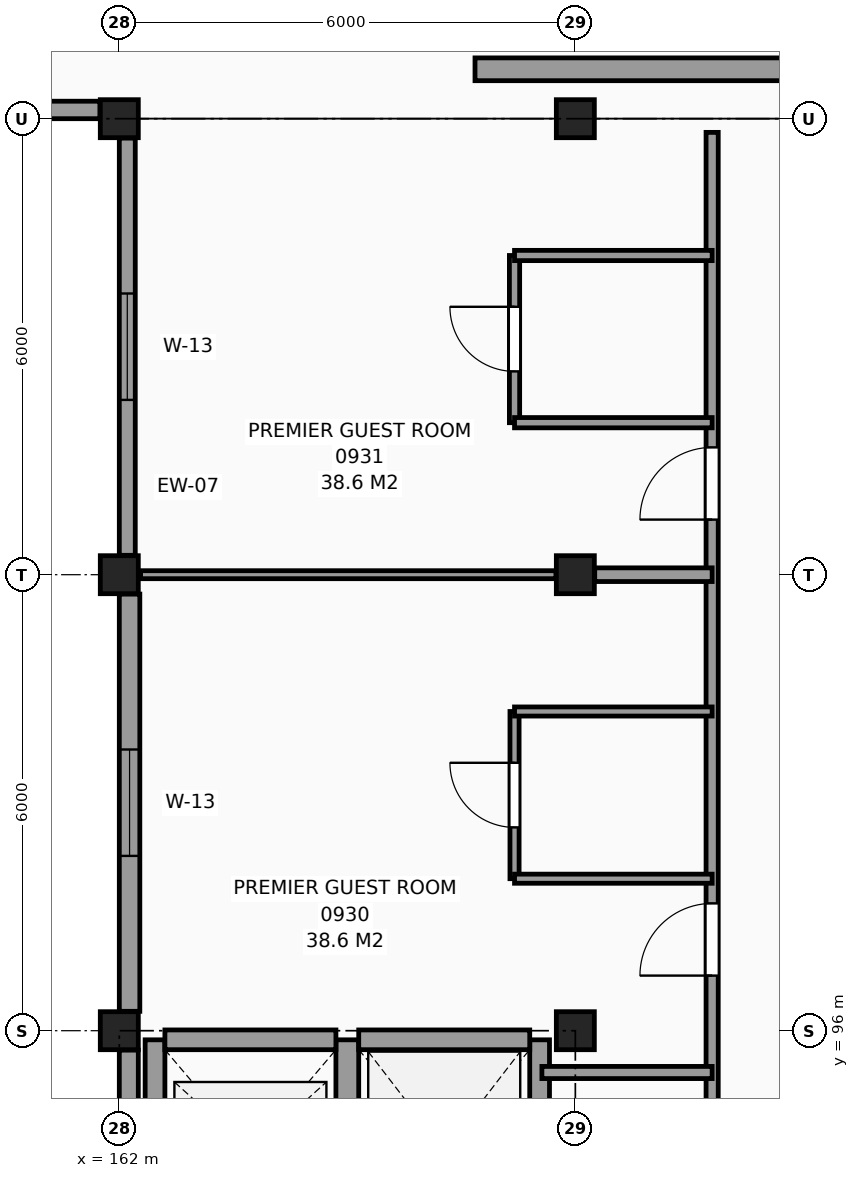
"""IFC4 building model, lengths in metres.
Left out: names, types, materials, properties, quantities, classifications, styles, units other than length and angle.
Written with IfcOpenShell. Run it as: python <this file> out.ifc"""

import sys

from ifc_helpers import new_model, si_unit, direction, frame, frame_2d, origin, origin_2d, place, context, subcontext, project, spatial, rectangle, extrude, element, fill, save


model = new_model("IFC4")
c1 = context("Model", 3, precision=1e-05, world=origin(), true_north=direction((0.0, 1.0)))
c2 = subcontext(c1, "Body", "Model", "MODEL_VIEW")
j1 = project(units=[si_unit("LENGTHUNIT", "METRE"), si_unit("PLANEANGLEUNIT", "RADIAN")], contexts=[c1])
p1 = place(None, origin())
s1 = spatial("IfcSite", under=j1, at=p1, CompositionType="ELEMENT")
p2 = place(p1, origin())
s2 = spatial("IfcBuilding", under=s1, at=p2, CompositionType="ELEMENT")
p3 = place(p2, frame((0.0, 0.0, 38.1)))
s3 = spatial("IfcBuildingStorey", under=s2, at=p3, CompositionType="ELEMENT", Elevation=38.1)
for number, where, z_axis, x_axis in (
    (1, (162.0, 96.0, 0.0), (0.0, 0.0, 1.0), (1.0, 0.0, 0.0)),
    (2, (162.0, 102.0, 0.0), (0.0, 0.0, 1.0), (1.0, 0.0, 0.0)),
    (3, (162.0, 108.0, 0.0), (0.0, 0.0, 1.0), (1.0, 0.0, 0.0)),
    (4, (168.0, 96.0, 0.0), (0.0, 0.0, 1.0), (1.0, 0.0, 0.0)),
    (5, (168.0, 102.0, 0.0), (0.0, 0.0, 1.0), (1.0, 0.0, 0.0)),
    (6, (168.0, 108.0, 0.0), (0.0, 0.0, 1.0), (1.0, 0.0, 0.0)),
):
    element("IfcColumn", number, at=place(p3, frame(where, z_axis=z_axis, x_axis=x_axis)), inside=s3, PredefinedType="COLUMN", context=c2, shape_type="SweptSolid", body=[
        extrude(rectangle(XDim=0.5, YDim=0.5, at=origin_2d()), origin(), (0.0, 0.0, 1.0), 3.3),
    ])
p4 = place(p3, frame((156.255, 108.115, 0.0), z_axis=(0.0, 0.0, 1.0), x_axis=(1.0, 0.0, 0.0)))
e7 = element("IfcWall", 7, at=p4, inside=s3, PredefinedType="SOLIDWALL", context=c2, shape_type="SweptSolid", body=[
    extrude(rectangle(XDim=5.49, YDim=0.23, at=frame_2d((2.745, 0.0))), origin(), (0.0, 0.0, 1.0), 3.06),
])
p5 = place(p3, frame((162.105, 107.745, 0.0), z_axis=(0.0, 0.0, 1.0), x_axis=(0.0, -1.0, 0.0)))
e8 = element("IfcWall", 8, at=p5, inside=s3, PredefinedType="SOLIDWALL", context=c2, shape_type="SweptSolid", body=[
    extrude(rectangle(XDim=5.49, YDim=0.21, at=frame_2d((2.745, 0.0))), origin(), (0.0, 0.0, 1.0), 2.41),
])
p6 = place(p5, frame((2.045, 0.0, 0.8)))
e9 = element("IfcOpeningElement", 9, at=p6, cuts=e8, PredefinedType="OPENING", context=c2, shape_type="SweptSolid", body=[
    extrude(rectangle(XDim=1.4, YDim=1.4, at=frame_2d((0.7, 0.7))), frame((0.0, 0.115, 0.0), z_axis=(0.0, -1.0, 0.0), x_axis=(1.0, 0.0, 0.0)), (0.0, 0.0, 1.0), 0.23),
])
p7 = place(p3, frame((162.135, 101.745, 0.0), z_axis=(0.0, 0.0, 1.0), x_axis=(0.0, -1.0, 0.0)))
e10 = element("IfcWall", 10, at=p7, inside=s3, PredefinedType="SOLIDWALL", context=c2, shape_type="SweptSolid", body=[
    extrude(rectangle(XDim=5.49, YDim=0.27, at=frame_2d((2.745, 0.0))), origin(), (0.0, 0.0, 1.0), 2.41),
])
p8 = place(p7, frame((2.045, 0.0, 0.8)))
e11 = element("IfcOpeningElement", 11, at=p8, cuts=e10, PredefinedType="OPENING", context=c2, shape_type="SweptSolid", body=[
    extrude(rectangle(XDim=1.4, YDim=1.4, at=frame_2d((0.7, 0.7))), frame((0.0, 0.145, 0.0), z_axis=(0.0, -1.0, 0.0), x_axis=(1.0, 0.0, 0.0)), (0.0, 0.0, 1.0), 0.29),
])
p9 = place(p3, frame((162.125, 95.745, 0.0), z_axis=(0.0, 0.0, 1.0), x_axis=(0.0, -1.0, 0.0)))
e12 = element("IfcWall", 12, at=p9, inside=s3, PredefinedType="SOLIDWALL", context=c2, shape_type="SweptSolid", body=[
    extrude(rectangle(XDim=5.49, YDim=0.25, at=frame_2d((2.745, 0.0))), origin(), (0.0, 0.0, 1.0), 2.41),
])
p10 = place(p3, frame((166.68, 108.65, 0.0), z_axis=(0.0, 0.0, 1.0), x_axis=(1.0, 0.0, 0.0)))
e13 = element("IfcWall", 13, at=p10, inside=s3, PredefinedType="SHEAR", context=c2, shape_type="SweptSolid", body=[
    extrude(rectangle(XDim=4.24, YDim=0.3, at=frame_2d((2.12, 0.0))), origin(), (0.0, 0.0, 1.0), 3.3),
])
p11 = place(p3, frame((162.47, 92.97, 0.0), z_axis=(0.0, 0.0, 1.0), x_axis=(0.0, 1.0, 0.0)))
e14 = element("IfcWall", 14, at=p11, inside=s3, PredefinedType="SHEAR", context=c2, shape_type="SweptSolid", body=[
    extrude(rectangle(XDim=2.91, YDim=0.26, at=frame_2d((1.455, 0.0))), origin(), (0.0, 0.0, 1.0), 3.3),
])
p12 = place(p3, frame((165.0, 92.97, 0.0), z_axis=(0.0, 0.0, 1.0), x_axis=(0.0, 1.0, 0.0)))
e15 = element("IfcWall", 15, at=p12, inside=s3, PredefinedType="SHEAR", context=c2, shape_type="SweptSolid", body=[
    extrude(rectangle(XDim=2.91, YDim=0.3, at=frame_2d((1.455, 0.0))), origin(), (0.0, 0.0, 1.0), 3.3),
])
p13 = place(p3, frame((162.6, 95.88, 0.0), z_axis=(0.0, 0.0, 1.0), x_axis=(1.0, 0.0, 0.0)))
e16 = element("IfcWall", 16, at=p13, inside=s3, PredefinedType="SHEAR", context=c2, shape_type="SweptSolid", body=[
    extrude(rectangle(XDim=2.25, YDim=0.26, at=frame_2d((1.125, 0.0))), origin(), (0.0, 0.0, 1.0), 3.3),
])
p14 = place(p3, frame((167.53, 92.97, 0.0), z_axis=(0.0, 0.0, 1.0), x_axis=(0.0, 1.0, 0.0)))
e17 = element("IfcWall", 17, at=p14, inside=s3, PredefinedType="SHEAR", context=c2, shape_type="SweptSolid", body=[
    extrude(rectangle(XDim=2.91, YDim=0.26, at=frame_2d((1.455, 0.0))), origin(), (0.0, 0.0, 1.0), 3.3),
])
p15 = place(p3, frame((165.15, 95.88, 0.0), z_axis=(0.0, 0.0, 1.0), x_axis=(1.0, 0.0, 0.0)))
e18 = element("IfcWall", 18, at=p15, inside=s3, PredefinedType="SHEAR", context=c2, shape_type="SweptSolid", body=[
    extrude(rectangle(XDim=2.25, YDim=0.26, at=frame_2d((1.125, 0.0))), origin(), (0.0, 0.0, 1.0), 3.3),
])
p16 = place(p3, frame((167.2, 98.0, 0.0), z_axis=(0.0, 0.0, 1.0), x_axis=(0.0, 1.0, 0.0)))
e19 = element("IfcWall", 19, at=p16, inside=s3, PredefinedType="PARTITIONING", context=c2, shape_type="SweptSolid", body=[
    extrude(rectangle(XDim=2.2, YDim=0.12, at=frame_2d((1.1, 0.0))), origin(), (0.0, 0.0, 1.0), 3.06),
])
p17 = place(p16, frame((0.675, 0.0, 0.0)))
e20 = element("IfcOpeningElement", 20, at=p17, cuts=e19, PredefinedType="OPENING", context=c2, shape_type="SweptSolid", body=[
    extrude(rectangle(XDim=0.85, YDim=2.1, at=frame_2d((0.425, 1.05))), frame((0.0, 0.07, 0.0), z_axis=(0.0, -1.0, 0.0), x_axis=(1.0, 0.0, 0.0)), (0.0, 0.0, 1.0), 0.14),
])
p18 = place(p3, frame((167.2, 104.0, 0.0), z_axis=(0.0, 0.0, 1.0), x_axis=(0.0, 1.0, 0.0)))
e21 = element("IfcWall", 21, at=p18, inside=s3, PredefinedType="PARTITIONING", context=c2, shape_type="SweptSolid", body=[
    extrude(rectangle(XDim=2.2, YDim=0.135, at=frame_2d((1.1, 0.0))), origin(), (0.0, 0.0, 1.0), 3.06),
])
p19 = place(p18, frame((0.675, 0.0, 0.0)))
e22 = element("IfcOpeningElement", 22, at=p19, cuts=e21, PredefinedType="OPENING", context=c2, shape_type="SweptSolid", body=[
    extrude(rectangle(XDim=0.85, YDim=2.1, at=frame_2d((0.425, 1.05))), frame((0.0, 0.078, 0.0), z_axis=(0.0, -1.0, 0.0), x_axis=(1.0, 0.0, 0.0)), (0.0, 0.0, 1.0), 0.155),
])
p20 = place(p3, frame((169.8, 42.215, 0.0), z_axis=(0.0, 0.0, 1.0), x_axis=(0.0, 1.0, 0.0)))
e23 = element("IfcWall", 23, at=p20, inside=s3, PredefinedType="PARTITIONING", context=c2, shape_type="SweptSolid", body=[
    extrude(rectangle(XDim=65.605, YDim=0.16, at=frame_2d((32.802, 0.0))), origin(), (0.0, 0.0, 1.0), 3.06),
])
p21 = place(p20, frame((50.185, 0.0, 0.0)))
e24 = element("IfcOpeningElement", 24, at=p21, cuts=e23, PredefinedType="OPENING", context=c2, shape_type="SweptSolid", body=[
    extrude(rectangle(XDim=1.2, YDim=2.2, at=frame_2d((0.6, 1.1))), frame((0.0, 0.09, 0.0), z_axis=(0.0, -1.0, 0.0), x_axis=(1.0, 0.0, 0.0)), (0.0, 0.0, 1.0), 0.18),
])
p22 = place(p20, frame((32.285, 0.0, 0.0)))
e25 = element("IfcOpeningElement", 25, at=p22, cuts=e23, PredefinedType="OPENING", context=c2, shape_type="SweptSolid", body=[
    extrude(rectangle(XDim=1.0, YDim=2.15, at=frame_2d((0.5, 1.075))), frame((0.0, 0.09, 0.0), z_axis=(0.0, -1.0, 0.0), x_axis=(1.0, 0.0, 0.0)), (0.0, 0.0, 1.0), 0.18),
])
p23 = place(p20, frame((0.46, 0.0, 0.0)))
e26 = element("IfcOpeningElement", 26, at=p23, cuts=e23, PredefinedType="OPENING", context=c2, shape_type="SweptSolid", body=[
    extrude(rectangle(XDim=0.95, YDim=2.1, at=frame_2d((0.475, 1.05))), frame((0.0, 0.09, 0.0), z_axis=(0.0, -1.0, 0.0), x_axis=(1.0, 0.0, 0.0)), (0.0, 0.0, 1.0), 0.18),
])
p24 = place(p20, frame((6.51, 0.0, 0.0)))
e27 = element("IfcOpeningElement", 27, at=p24, cuts=e23, PredefinedType="OPENING", context=c2, shape_type="SweptSolid", body=[
    extrude(rectangle(XDim=0.95, YDim=2.1, at=frame_2d((0.475, 1.05))), frame((0.0, 0.09, 0.0), z_axis=(0.0, -1.0, 0.0), x_axis=(1.0, 0.0, 0.0)), (0.0, 0.0, 1.0), 0.18),
])
p25 = place(p20, frame((12.51, 0.0, 0.0)))
e28 = element("IfcOpeningElement", 28, at=p25, cuts=e23, PredefinedType="OPENING", context=c2, shape_type="SweptSolid", body=[
    extrude(rectangle(XDim=0.95, YDim=2.1, at=frame_2d((0.475, 1.05))), frame((0.0, 0.09, 0.0), z_axis=(0.0, -1.0, 0.0), x_axis=(1.0, 0.0, 0.0)), (0.0, 0.0, 1.0), 0.18),
])
p26 = place(p20, frame((18.51, 0.0, 0.0)))
e29 = element("IfcOpeningElement", 29, at=p26, cuts=e23, PredefinedType="OPENING", context=c2, shape_type="SweptSolid", body=[
    extrude(rectangle(XDim=0.95, YDim=2.1, at=frame_2d((0.475, 1.05))), frame((0.0, 0.09, 0.0), z_axis=(0.0, -1.0, 0.0), x_axis=(1.0, 0.0, 0.0)), (0.0, 0.0, 1.0), 0.18),
])
p27 = place(p20, frame((24.51, 0.0, 0.0)))
e30 = element("IfcOpeningElement", 30, at=p27, cuts=e23, PredefinedType="OPENING", context=c2, shape_type="SweptSolid", body=[
    extrude(rectangle(XDim=0.95, YDim=2.1, at=frame_2d((0.475, 1.05))), frame((0.0, 0.09, 0.0), z_axis=(0.0, -1.0, 0.0), x_axis=(1.0, 0.0, 0.0)), (0.0, 0.0, 1.0), 0.18),
])
p28 = place(p20, frame((54.51, 0.0, 0.0)))
e31 = element("IfcOpeningElement", 31, at=p28, cuts=e23, PredefinedType="OPENING", context=c2, shape_type="SweptSolid", body=[
    extrude(rectangle(XDim=0.95, YDim=2.1, at=frame_2d((0.475, 1.05))), frame((0.0, 0.09, 0.0), z_axis=(0.0, -1.0, 0.0), x_axis=(1.0, 0.0, 0.0)), (0.0, 0.0, 1.0), 0.18),
])
p29 = place(p20, frame((60.51, 0.0, 0.0)))
e32 = element("IfcOpeningElement", 32, at=p29, cuts=e23, PredefinedType="OPENING", context=c2, shape_type="SweptSolid", body=[
    extrude(rectangle(XDim=0.95, YDim=2.1, at=frame_2d((0.475, 1.05))), frame((0.0, 0.09, 0.0), z_axis=(0.0, -1.0, 0.0), x_axis=(1.0, 0.0, 0.0)), (0.0, 0.0, 1.0), 0.18),
])
p30 = place(p3, frame((167.56, 95.45, 0.0), z_axis=(0.0, 0.0, 1.0), x_axis=(1.0, 0.0, 0.0)))
e33 = element("IfcWall", 33, at=p30, inside=s3, PredefinedType="PARTITIONING", context=c2, shape_type="SweptSolid", body=[
    extrude(rectangle(XDim=2.24, YDim=0.16, at=frame_2d((1.12, 0.0))), origin(), (0.0, 0.0, 1.0), 3.06),
])
for number, where, z_axis, x_axis in (
    (34, (167.2, 98.0, 0.0), (0.0, 0.0, 1.0), (1.0, 0.0, 0.0)),
    (35, (167.2, 100.2, 0.0), (0.0, 0.0, 1.0), (1.0, 0.0, 0.0)),
):
    element("IfcWall", number, at=place(p3, frame(where, z_axis=z_axis, x_axis=x_axis)), inside=s3, PredefinedType="PARTITIONING", context=c2, shape_type="SweptSolid", body=[
        extrude(rectangle(XDim=2.6, YDim=0.12, at=frame_2d((1.3, 0.0))), origin(), (0.0, 0.0, 1.0), 3.06),
    ])
p31 = place(p3, frame((162.28, 102.0, 0.0), z_axis=(0.0, 0.0, 1.0), x_axis=(1.0, 0.0, 0.0)))
e36 = element("IfcWall", 36, at=p31, inside=s3, PredefinedType="PARTITIONING", context=c2, shape_type="SweptSolid", body=[
    extrude(rectangle(XDim=5.465, YDim=0.105, at=frame_2d((2.732, 0.0))), origin(), (0.0, 0.0, 1.0), 2.46),
])
p32 = place(p3, frame((168.255, 102.0, 0.0), z_axis=(0.0, 0.0, 1.0), x_axis=(1.0, 0.0, 0.0)))
e37 = element("IfcWall", 37, at=p32, inside=s3, PredefinedType="PARTITIONING", context=c2, shape_type="SweptSolid", body=[
    extrude(rectangle(XDim=1.545, YDim=0.18, at=frame_2d((0.772, 0.0))), origin(), (0.0, 0.0, 1.0), 2.61),
])
for number, where, z_axis, x_axis in (
    (38, (167.2, 104.0, 0.0), (0.0, 0.0, 1.0), (1.0, 0.0, 0.0)),
    (39, (167.2, 106.2, 0.0), (0.0, 0.0, 1.0), (1.0, 0.0, 0.0)),
):
    element("IfcWall", number, at=place(p3, frame(where, z_axis=z_axis, x_axis=x_axis)), inside=s3, PredefinedType="PARTITIONING", context=c2, shape_type="SweptSolid", body=[
        extrude(rectangle(XDim=2.6, YDim=0.135, at=frame_2d((1.3, 0.0))), origin(), (0.0, 0.0, 1.0), 3.06),
    ])
p33 = place(p8, origin())
e40 = element("IfcWindow", 40, at=p33, inside=s3, PartitioningType="SINGLE_PANEL", PredefinedType="WINDOW", context=c2, shape_type="SweptSolid", body=[
    extrude(rectangle(XDim=1.4, YDim=1.4, at=frame_2d((0.7, 0.7))), frame((0.0, 0.03, 0.0), z_axis=(0.0, -1.0, 0.0), x_axis=(1.0, 0.0, 0.0)), (0.0, 0.0, 1.0), 0.06),
])
fill(e11, e40)
p34 = place(p6, origin())
e41 = element("IfcWindow", 41, at=p34, inside=s3, PartitioningType="SINGLE_PANEL", PredefinedType="WINDOW", context=c2, shape_type="SweptSolid", body=[
    extrude(rectangle(XDim=1.4, YDim=1.4, at=frame_2d((0.7, 0.7))), frame((0.0, 0.03, 0.0), z_axis=(0.0, -1.0, 0.0), x_axis=(1.0, 0.0, 0.0)), (0.0, 0.0, 1.0), 0.06),
])
fill(e9, e41)
p35 = place(p17, origin())
e42 = element("IfcDoor", 42, at=p35, inside=s3, OperationType="SINGLE_SWING_RIGHT", PredefinedType="DOOR", context=c2, shape_type="SweptSolid", body=[
    extrude(rectangle(XDim=0.85, YDim=2.1, at=frame_2d((0.425, 1.05))), frame((0.0, 0.025, 0.0), z_axis=(0.0, -1.0, 0.0), x_axis=(1.0, 0.0, 0.0)), (0.0, 0.0, 1.0), 0.05),
])
fill(e20, e42)
p36 = place(p28, origin())
e43 = element("IfcDoor", 43, at=p36, inside=s3, OperationType="SINGLE_SWING_LEFT", PredefinedType="DOOR", context=c2, shape_type="SweptSolid", body=[
    extrude(rectangle(XDim=0.95, YDim=2.1, at=frame_2d((0.475, 1.05))), frame((0.0, 0.025, 0.0), z_axis=(0.0, -1.0, 0.0), x_axis=(1.0, 0.0, 0.0)), (0.0, 0.0, 1.0), 0.05),
])
fill(e31, e43)
p37 = place(p19, origin())
e44 = element("IfcDoor", 44, at=p37, inside=s3, OperationType="SINGLE_SWING_RIGHT", PredefinedType="DOOR", context=c2, shape_type="SweptSolid", body=[
    extrude(rectangle(XDim=0.85, YDim=2.1, at=frame_2d((0.425, 1.05))), frame((0.0, 0.025, 0.0), z_axis=(0.0, -1.0, 0.0), x_axis=(1.0, 0.0, 0.0)), (0.0, 0.0, 1.0), 0.05),
])
fill(e22, e44)
p38 = place(p29, origin())
e45 = element("IfcDoor", 45, at=p38, inside=s3, OperationType="SINGLE_SWING_LEFT", PredefinedType="DOOR", context=c2, shape_type="SweptSolid", body=[
    extrude(rectangle(XDim=0.95, YDim=2.1, at=frame_2d((0.475, 1.05))), frame((0.0, 0.025, 0.0), z_axis=(0.0, -1.0, 0.0), x_axis=(1.0, 0.0, 0.0)), (0.0, 0.0, 1.0), 0.05),
])
fill(e32, e45)
save(model, sys.argv[1])
